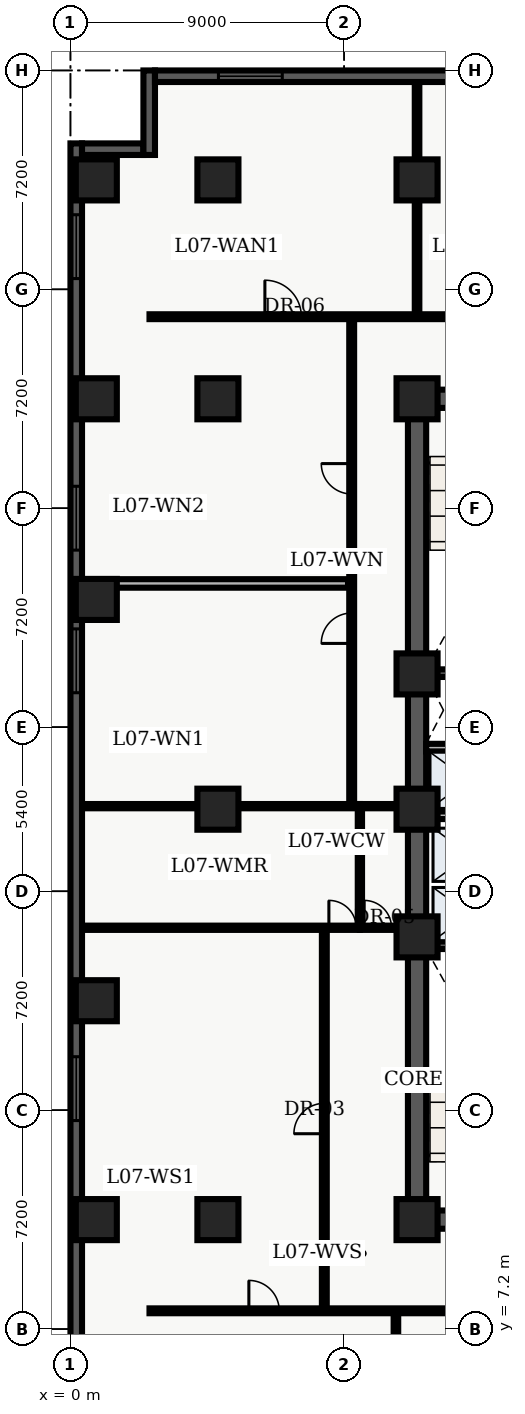
"""IFC4 building model, lengths in metres.
Left out: names, types, materials, properties, quantities, classifications, styles, units other than length and angle.
Written with IfcOpenShell. Run it as: python <this file> out.ifc"""

import sys

from ifc_helpers import new_model, entity, si_unit, converted_unit, direction, frame, origin_with_axes, origin_2d_with_axis, place, context, subcontext, project, spatial, polyline, rectangle, outline, extrude, element, fill, save


model = new_model("IFC4")
c1 = context("Model", 3, precision=1e-05, world=origin_with_axes(), true_north=direction((0.0, 1.0)))
c2 = subcontext(c1, "Body", "Model", "MODEL_VIEW")
j1 = project(units=[si_unit("LENGTHUNIT", "METRE"), converted_unit("PLANEANGLEUNIT", "DEGREE", entity("IfcPlaneAngleMeasure", 0.017), si_unit("PLANEANGLEUNIT", "RADIAN"), dimensions=[0, 0, 0, 0, 0, 0, 0])], contexts=[c1])
p1 = place(None, origin_with_axes())
s1 = spatial("IfcSite", under=j1, at=p1, CompositionType="ELEMENT")
p2 = place(p1, origin_with_axes())
s2 = spatial("IfcBuilding", under=s1, at=p2, CompositionType="ELEMENT")
p3 = place(p2, frame((0.0, 0.0, 32.7), z_axis=(0.0, 0.0, 1.0), x_axis=(1.0, 0.0, 0.0)))
s3 = spatial("IfcBuildingStorey", under=s2, at=p3, CompositionType="ELEMENT", Elevation=32.7)
p4 = place(p3, frame((11.4, 10.8, 0.0), z_axis=(0.0, 0.0, 1.0), x_axis=(0.0, 1.0, 0.0)))
e1 = element("IfcWall", 1, at=p4, inside=s3, PredefinedType="SHEAR", context=c2, shape_type="SweptSolid", body=[
    extrude(outline(polyline([(0.0, -0.3), (27.0, -0.3), (27.0, 0.3), (0.0, 0.3), (0.0, -0.3)])), origin_with_axes(), (0.0, 0.0, 1.0), 3.66),
])
p5 = place(p3, frame((11.4, 10.8, 0.0), z_axis=(0.0, 0.0, 1.0), x_axis=(1.0, 0.0, 0.0)))
e2 = element("IfcWall", 2, at=p5, inside=s3, PredefinedType="SHEAR", context=c2, shape_type="SweptSolid", body=[
    extrude(outline(polyline([(0.0, -0.3), (7.2, -0.3), (7.2, 0.3), (0.0, 0.3), (0.0, -0.3)])), origin_with_axes(), (0.0, 0.0, 1.0), 3.66),
])
p6 = place(p5, frame((2.625, 0.0, 0.0), z_axis=(0.0, 0.0, 1.0), x_axis=(1.0, 0.0, 0.0)))
e3 = element("IfcOpeningElement", 3, at=p6, cuts=e2, PredefinedType="OPENING", context=c2, shape_type="SweptSolid", body=[
    extrude(rectangle(XDim=1.05, YDim=0.62, at=origin_2d_with_axis()), origin_with_axes(), (0.0, 0.0, 1.0), 2.15),
])
p7 = place(p3, frame((11.4, 37.8, 0.0), z_axis=(0.0, 0.0, 1.0), x_axis=(1.0, 0.0, 0.0)))
e4 = element("IfcWall", 4, at=p7, inside=s3, PredefinedType="SHEAR", context=c2, shape_type="SweptSolid", body=[
    extrude(outline(polyline([(0.0, -0.3), (7.2, -0.3), (7.2, 0.3), (0.0, 0.3), (0.0, -0.3)])), origin_with_axes(), (0.0, 0.0, 1.0), 3.66),
])
p8 = place(p7, frame((2.625, 0.0, 0.0), z_axis=(0.0, 0.0, 1.0), x_axis=(1.0, 0.0, 0.0)))
e5 = element("IfcOpeningElement", 5, at=p8, cuts=e4, PredefinedType="OPENING", context=c2, shape_type="SweptSolid", body=[
    extrude(rectangle(XDim=1.05, YDim=0.62, at=origin_2d_with_axis()), origin_with_axes(), (0.0, 0.0, 1.0), 2.15),
])
for number, where, z_axis, x_axis in (
    (6, (11.7, 19.825, 0.0), (0.0, 0.0, 1.0), (1.0, 0.0, 0.0)),
    (7, (11.7, 28.775, 0.0), (0.0, 0.0, 1.0), (1.0, 0.0, 0.0)),
):
    element("IfcWall", number, at=place(p3, frame(where, z_axis=z_axis, x_axis=x_axis)), inside=s3, PredefinedType="SHEAR", context=c2, shape_type="SweptSolid", body=[
        extrude(outline(polyline([(0.0, -0.125), (6.6, -0.125), (6.6, 0.125), (0.0, 0.125), (0.0, -0.125)])), origin_with_axes(), (0.0, 0.0, 1.0), 3.66),
    ])
p9 = place(p3, frame((11.7, 24.1, 0.0), z_axis=(0.0, 0.0, 1.0), x_axis=(1.0, 0.0, 0.0)))
e8 = element("IfcWall", 8, at=p9, inside=s3, PredefinedType="SOLIDWALL", context=c2, shape_type="SweptSolid", body=[
    extrude(outline(polyline([(0.0, -0.125), (6.6, -0.125), (6.6, 0.125), (0.0, 0.125), (0.0, -0.125)])), origin_with_axes(), (0.0, 0.0, 1.0), 2.7),
])
p10 = place(p9, frame((3.75, 0.0, 0.0), z_axis=(0.0, 0.0, 1.0), x_axis=(1.0, 0.0, 0.0)))
e9 = element("IfcOpeningElement", 9, at=p10, cuts=e8, PredefinedType="OPENING", context=c2, shape_type="SweptSolid", body=[
    extrude(rectangle(XDim=0.9, YDim=0.27, at=origin_2d_with_axis()), origin_with_axes(), (0.0, 0.0, 1.0), 2.15),
])
p11 = place(p3, frame((11.7, 26.325, 0.0), z_axis=(0.0, 0.0, 1.0), x_axis=(1.0, 0.0, 0.0)))
e10 = element("IfcWall", 10, at=p11, inside=s3, PredefinedType="SOLIDWALL", context=c2, shape_type="SweptSolid", body=[
    extrude(outline(polyline([(0.0, -0.125), (6.6, -0.125), (6.6, 0.125), (0.0, 0.125), (0.0, -0.125)])), origin_with_axes(), (0.0, 0.0, 1.0), 2.7),
])
p12 = place(p11, frame((3.5, 0.0, 0.0), z_axis=(0.0, 0.0, 1.0), x_axis=(1.0, 0.0, 0.0)))
e11 = element("IfcOpeningElement", 11, at=p12, cuts=e10, PredefinedType="OPENING", context=c2, shape_type="SweptSolid", body=[
    extrude(rectangle(XDim=0.9, YDim=0.27, at=origin_2d_with_axis()), origin_with_axes(), (0.0, 0.0, 1.0), 2.15),
])
for number, where, z_axis, x_axis in (
    (12, (11.4, 10.8, 0.0), (0.0, 0.0, 1.0), (1.0, 0.0, 0.0)),
    (13, (11.4, 20.1, 0.0), (0.0, 0.0, 1.0), (1.0, 0.0, 0.0)),
    (14, (11.4, 24.3, 0.0), (0.0, 0.0, 1.0), (1.0, 0.0, 0.0)),
    (15, (11.4, 28.75, 0.0), (0.0, 0.0, 1.0), (1.0, 0.0, 0.0)),
    (16, (11.4, 37.8, 0.0), (0.0, 0.0, 1.0), (1.0, 0.0, 0.0)),
    (17, (11.4, 45.0, 0.0), (0.0, 0.0, 1.0), (1.0, 0.0, 0.0)),
    (18, (4.85, 10.8, 0.0), (0.0, 0.0, 1.0), (1.0, 0.0, 0.0)),
    (19, (4.85, 24.3, 0.0), (0.0, 0.0, 1.0), (1.0, 0.0, 0.0)),
    (20, (4.85, 37.8, 0.0), (0.0, 0.0, 1.0), (1.0, 0.0, 0.0)),
    (21, (4.85, 45.0, 0.0), (0.0, 0.0, 1.0), (1.0, 0.0, 0.0)),
    (22, (0.85, 10.8, 0.0), (0.0, 0.0, 1.0), (1.0, 0.0, 0.0)),
    (23, (0.85, 18.0, 0.0), (0.0, 0.0, 1.0), (1.0, 0.0, 0.0)),
    (24, (0.85, 31.2, 0.0), (0.0, 0.0, 1.0), (1.0, 0.0, 0.0)),
    (25, (0.85, 37.8, 0.0), (0.0, 0.0, 1.0), (1.0, 0.0, 0.0)),
    (26, (0.85, 45.0, 0.0), (0.0, 0.0, 1.0), (1.0, 0.0, 0.0)),
):
    element("IfcColumn", number, at=place(p3, frame(where, z_axis=z_axis, x_axis=x_axis)), inside=s3, PredefinedType="COLUMN", context=c2, shape_type="SweptSolid", body=[
        extrude(rectangle(XDim=1.35, YDim=1.35, at=origin_2d_with_axis()), origin_with_axes(), (0.0, 0.0, 1.0), 3.9),
    ])
p13 = place(p3, frame((9.52, 20.4, 0.0), z_axis=(0.0, 0.0, 1.0), x_axis=(0.0, 1.0, 0.0)))
e27 = element("IfcWall", 27, at=p13, inside=s3, PredefinedType="PARTITIONING", context=c2, shape_type="SweptSolid", body=[
    extrude(outline(polyline([(0.0, -0.07), (4.0, -0.07), (4.0, 0.07), (0.0, 0.07), (0.0, -0.07)])), origin_with_axes(), (0.0, 0.0, 1.0), 2.7),
])
p14 = place(p3, frame((9.52, 20.4, 0.0), z_axis=(0.0, 0.0, 1.0), x_axis=(1.0, 0.0, 0.0)))
e28 = element("IfcWall", 28, at=p14, inside=s3, PredefinedType="PARTITIONING", context=c2, shape_type="SweptSolid", body=[
    extrude(outline(polyline([(0.0, -0.07), (1.58, -0.07), (1.58, 0.07), (0.0, 0.07), (0.0, -0.07)])), origin_with_axes(), (0.0, 0.0, 1.0), 2.7),
])
p15 = place(p14, frame((0.59, 0.0, 0.0), z_axis=(0.0, 0.0, 1.0), x_axis=(1.0, 0.0, 0.0)))
e29 = element("IfcOpeningElement", 29, at=p15, cuts=e28, PredefinedType="OPENING", context=c2, shape_type="SweptSolid", body=[
    extrude(rectangle(XDim=0.9, YDim=0.16, at=origin_2d_with_axis()), origin_with_axes(), (0.0, 0.0, 1.0), 2.15),
])
p16 = place(p3, frame((9.52, 24.4, 0.0), z_axis=(0.0, 0.0, 1.0), x_axis=(1.0, 0.0, 0.0)))
e30 = element("IfcWall", 30, at=p16, inside=s3, PredefinedType="PARTITIONING", context=c2, shape_type="SweptSolid", body=[
    extrude(outline(polyline([(0.0, -0.07), (1.58, -0.07), (1.58, 0.07), (0.0, 0.07), (0.0, -0.07)])), origin_with_axes(), (0.0, 0.0, 1.0), 2.7),
])
p17 = place(p3, frame((2.6, 7.8, 0.0), z_axis=(0.0, 0.0, 1.0), x_axis=(1.0, 0.0, 0.0)))
e31 = element("IfcWall", 31, at=p17, inside=s3, PredefinedType="PARTITIONING", context=c2, shape_type="SweptSolid", body=[
    extrude(outline(polyline([(0.0, -0.08), (18.55, -0.08), (18.55, 0.08), (0.0, 0.08), (0.0, -0.08)])), origin_with_axes(), (0.0, 0.0, 1.0), 2.7),
])
p18 = place(p17, frame((3.768, 0.0, 0.0), z_axis=(0.0, 0.0, 1.0), x_axis=(1.0, 0.0, 0.0)))
e32 = element("IfcOpeningElement", 32, at=p18, cuts=e31, PredefinedType="OPENING", context=c2, shape_type="SweptSolid", body=[
    extrude(rectangle(XDim=1.0, YDim=0.18, at=origin_2d_with_axis()), origin_with_axes(), (0.0, 0.0, 1.0), 2.15),
])
p19 = place(p17, frame((13.303, 0.0, 0.0), z_axis=(0.0, 0.0, 1.0), x_axis=(1.0, 0.0, 0.0)))
e33 = element("IfcOpeningElement", 33, at=p19, cuts=e31, PredefinedType="OPENING", context=c2, shape_type="SweptSolid", body=[
    extrude(rectangle(XDim=1.0, YDim=0.18, at=origin_2d_with_axis()), origin_with_axes(), (0.0, 0.0, 1.0), 2.15),
])
p20 = place(p3, frame((2.6, 40.5, 0.0), z_axis=(0.0, 0.0, 1.0), x_axis=(1.0, 0.0, 0.0)))
e34 = element("IfcWall", 34, at=p20, inside=s3, PredefinedType="PARTITIONING", context=c2, shape_type="SweptSolid", body=[
    extrude(outline(polyline([(0.0, -0.08), (18.65, -0.08), (18.65, 0.08), (0.0, 0.08), (0.0, -0.08)])), origin_with_axes(), (0.0, 0.0, 1.0), 2.7),
])
p21 = place(p20, frame((4.395, 0.0, 0.0), z_axis=(0.0, 0.0, 1.0), x_axis=(1.0, 0.0, 0.0)))
e35 = element("IfcOpeningElement", 35, at=p21, cuts=e34, PredefinedType="OPENING", context=c2, shape_type="SweptSolid", body=[
    extrude(rectangle(XDim=1.2, YDim=0.18, at=origin_2d_with_axis()), origin_with_axes(), (0.0, 0.0, 1.0), 2.2),
])
p22 = place(p20, frame((12.61, 0.0, 0.0), z_axis=(0.0, 0.0, 1.0), x_axis=(1.0, 0.0, 0.0)))
e36 = element("IfcOpeningElement", 36, at=p22, cuts=e34, PredefinedType="OPENING", context=c2, shape_type="SweptSolid", body=[
    extrude(rectangle(XDim=1.0, YDim=0.18, at=origin_2d_with_axis()), origin_with_axes(), (0.0, 0.0, 1.0), 2.15),
])
p23 = place(p3, frame((8.35, 7.8, 0.0), z_axis=(0.0, 0.0, 1.0), x_axis=(0.0, 1.0, 0.0)))
e37 = element("IfcWall", 37, at=p23, inside=s3, PredefinedType="PARTITIONING", context=c2, shape_type="SweptSolid", body=[
    extrude(outline(polyline([(0.0, -0.08), (12.6, -0.08), (12.6, 0.08), (0.0, 0.08), (0.0, -0.08)])), origin_with_axes(), (0.0, 0.0, 1.0), 2.7),
])
p24 = place(p23, frame((6.325, 0.0, 0.0), z_axis=(0.0, 0.0, 1.0), x_axis=(1.0, 0.0, 0.0)))
e38 = element("IfcOpeningElement", 38, at=p24, cuts=e37, PredefinedType="OPENING", context=c2, shape_type="SweptSolid", body=[
    extrude(rectangle(XDim=1.0, YDim=0.18, at=origin_2d_with_axis()), origin_with_axes(), (0.0, 0.0, 1.0), 2.15),
])
p25 = place(p3, frame((9.25, 24.4, 0.0), z_axis=(0.0, 0.0, 1.0), x_axis=(0.0, 1.0, 0.0)))
e39 = element("IfcWall", 39, at=p25, inside=s3, PredefinedType="PARTITIONING", context=c2, shape_type="SweptSolid", body=[
    extrude(outline(polyline([(0.0, -0.08), (16.1, -0.08), (16.1, 0.08), (0.0, 0.08), (0.0, -0.08)])), origin_with_axes(), (0.0, 0.0, 1.0), 2.7),
])
p26 = place(p25, frame((5.853, 0.0, 0.0), z_axis=(0.0, 0.0, 1.0), x_axis=(1.0, 0.0, 0.0)))
e40 = element("IfcOpeningElement", 40, at=p26, cuts=e39, PredefinedType="OPENING", context=c2, shape_type="SweptSolid", body=[
    extrude(rectangle(XDim=1.0, YDim=0.18, at=origin_2d_with_axis()), origin_with_axes(), (0.0, 0.0, 1.0), 2.15),
])
p27 = place(p25, frame((10.768, 0.0, 0.0), z_axis=(0.0, 0.0, 1.0), x_axis=(1.0, 0.0, 0.0)))
e41 = element("IfcOpeningElement", 41, at=p27, cuts=e39, PredefinedType="OPENING", context=c2, shape_type="SweptSolid", body=[
    extrude(rectangle(XDim=1.0, YDim=0.18, at=origin_2d_with_axis()), origin_with_axes(), (0.0, 0.0, 1.0), 2.15),
])
p28 = place(p3, frame((0.36, 20.4, 0.0), z_axis=(0.0, 0.0, 1.0), x_axis=(1.0, 0.0, 0.0)))
e42 = element("IfcWall", 42, at=p28, inside=s3, PredefinedType="PARTITIONING", context=c2, shape_type="SweptSolid", body=[
    extrude(outline(polyline([(0.0, -0.07), (9.16, -0.07), (9.16, 0.07), (0.0, 0.07), (0.0, -0.07)])), origin_with_axes(), (0.0, 0.0, 1.0), 2.7),
])
p29 = place(p28, frame((8.59, 0.0, 0.0), z_axis=(0.0, 0.0, 1.0), x_axis=(1.0, 0.0, 0.0)))
e43 = element("IfcOpeningElement", 43, at=p29, cuts=e42, PredefinedType="OPENING", context=c2, shape_type="SweptSolid", body=[
    extrude(rectangle(XDim=0.9, YDim=0.16, at=origin_2d_with_axis()), origin_with_axes(), (0.0, 0.0, 1.0), 2.15),
])
p30 = place(p3, frame((0.36, 24.4, 0.0), z_axis=(0.0, 0.0, 1.0), x_axis=(1.0, 0.0, 0.0)))
e44 = element("IfcWall", 44, at=p30, inside=s3, PredefinedType="PARTITIONING", context=c2, shape_type="SweptSolid", body=[
    extrude(outline(polyline([(0.0, -0.07), (9.16, -0.07), (9.16, 0.07), (0.0, 0.07), (0.0, -0.07)])), origin_with_axes(), (0.0, 0.0, 1.0), 2.7),
])
p31 = place(p3, frame((0.375, 31.726, 0.0), z_axis=(0.0, 0.0, 1.0), x_axis=(1.0, 0.0, 0.0)))
e45 = element("IfcWall", 45, at=p31, inside=s3, PredefinedType="PARTITIONING", context=c2, shape_type="SweptSolid", body=[
    extrude(outline(polyline([(0.0, -0.14), (8.755, -0.14), (8.755, 0.14), (0.0, 0.14), (0.0, -0.14)])), origin_with_axes(), (0.0, 0.0, 1.0), 2.7),
])
p32 = place(p3, frame((10.705, 0.36, 0.0), z_axis=(0.0, 0.0, 1.0), x_axis=(0.0, 1.0, 0.0)))
e46 = element("IfcWall", 46, at=p32, inside=s3, PredefinedType="PARTITIONING", context=c2, shape_type="SweptSolid", body=[
    extrude(outline(polyline([(0.0, -0.075), (7.34, -0.075), (7.34, 0.075), (0.0, 0.075), (0.0, -0.075)])), origin_with_axes(), (0.0, 0.0, 1.0), 2.7),
])
p33 = place(p3, frame((11.4, 40.6, 0.0), z_axis=(0.0, 0.0, 1.0), x_axis=(0.0, 1.0, 0.0)))
e47 = element("IfcWall", 47, at=p33, inside=s3, PredefinedType="PARTITIONING", context=c2, shape_type="SweptSolid", body=[
    extrude(outline(polyline([(0.0, -0.075), (7.64, -0.075), (7.64, 0.075), (0.0, 0.075), (0.0, -0.075)])), origin_with_axes(), (0.0, 0.0, 1.0), 2.7),
])
p34 = place(p3, frame((0.19, 2.78, 0.0), z_axis=(0.0, 0.0, 1.0), x_axis=(0.0, 1.0, 0.0)))
e48 = element("IfcWall", 48, at=p34, inside=s3, PredefinedType="SOLIDWALL", context=c2, shape_type="SweptSolid", body=[
    extrude(outline(polyline([(0.0, -0.19), (43.42, -0.19), (43.42, 0.19), (0.0, 0.19), (0.0, -0.19)])), origin_with_axes(), (0.0, 0.0, 1.0), 3.66),
])
p35 = place(p34, frame((2.946, 0.0, 0.45), z_axis=(0.0, 0.0, 1.0), x_axis=(1.0, 0.0, 0.0)))
e49 = element("IfcOpeningElement", 49, at=p35, cuts=e48, PredefinedType="OPENING", context=c2, shape_type="SweptSolid", body=[
    extrude(rectangle(XDim=2.1, YDim=0.4, at=origin_2d_with_axis()), origin_with_axes(), (0.0, 0.0, 1.0), 2.2),
])
p36 = place(p34, frame((12.328, 0.0, 0.45), z_axis=(0.0, 0.0, 1.0), x_axis=(1.0, 0.0, 0.0)))
e50 = element("IfcOpeningElement", 50, at=p36, cuts=e48, PredefinedType="OPENING", context=c2, shape_type="SweptSolid", body=[
    extrude(rectangle(XDim=2.1, YDim=0.4, at=origin_2d_with_axis()), origin_with_axes(), (0.0, 0.0, 1.0), 2.2),
])
p37 = place(p34, frame((26.401, 0.0, 0.45), z_axis=(0.0, 0.0, 1.0), x_axis=(1.0, 0.0, 0.0)))
e51 = element("IfcOpeningElement", 51, at=p37, cuts=e48, PredefinedType="OPENING", context=c2, shape_type="SweptSolid", body=[
    extrude(rectangle(XDim=2.1, YDim=0.4, at=origin_2d_with_axis()), origin_with_axes(), (0.0, 0.0, 1.0), 2.2),
])
p38 = place(p34, frame((31.092, 0.0, 0.45), z_axis=(0.0, 0.0, 1.0), x_axis=(1.0, 0.0, 0.0)))
e52 = element("IfcOpeningElement", 52, at=p38, cuts=e48, PredefinedType="OPENING", context=c2, shape_type="SweptSolid", body=[
    extrude(rectangle(XDim=2.1, YDim=0.4, at=origin_2d_with_axis()), origin_with_axes(), (0.0, 0.0, 1.0), 2.2),
])
p39 = place(p34, frame((40.024, 0.0, 0.45), z_axis=(0.0, 0.0, 1.0), x_axis=(1.0, 0.0, 0.0)))
e53 = element("IfcOpeningElement", 53, at=p39, cuts=e48, PredefinedType="OPENING", context=c2, shape_type="SweptSolid", body=[
    extrude(rectangle(XDim=2.1, YDim=0.4, at=origin_2d_with_axis()), origin_with_axes(), (0.0, 0.0, 1.0), 2.2),
])
p40 = place(p3, frame((0.38, 46.01, 0.0), z_axis=(0.0, 0.0, 1.0), x_axis=(1.0, 0.0, 0.0)))
e54 = element("IfcWall", 54, at=p40, inside=s3, PredefinedType="SOLIDWALL", context=c2, shape_type="SweptSolid", body=[
    extrude(outline(polyline([(0.0, -0.19), (2.02, -0.19), (2.02, 0.19), (0.0, 0.19), (0.0, -0.19)])), origin_with_axes(), (0.0, 0.0, 1.0), 3.66),
])
p41 = place(p3, frame((2.59, 45.82, 0.0), z_axis=(0.0, 0.0, 1.0), x_axis=(0.0, 1.0, 0.0)))
e55 = element("IfcWall", 55, at=p41, inside=s3, PredefinedType="SOLIDWALL", context=c2, shape_type="SweptSolid", body=[
    extrude(outline(polyline([(0.0, -0.19), (2.78, -0.19), (2.78, 0.19), (0.0, 0.19), (0.0, -0.19)])), origin_with_axes(), (0.0, 0.0, 1.0), 3.66),
])
p42 = place(p3, frame((2.78, 48.41, 0.0), z_axis=(0.0, 0.0, 1.0), x_axis=(1.0, 0.0, 0.0)))
e56 = element("IfcWall", 56, at=p42, inside=s3, PredefinedType="SOLIDWALL", context=c2, shape_type="SweptSolid", body=[
    extrude(outline(polyline([(0.0, -0.19), (16.42, -0.19), (16.42, 0.19), (0.0, 0.19), (0.0, -0.19)])), origin_with_axes(), (0.0, 0.0, 1.0), 3.66),
])
p43 = place(p42, frame((3.137, 0.0, 0.45), z_axis=(0.0, 0.0, 1.0), x_axis=(1.0, 0.0, 0.0)))
e57 = element("IfcOpeningElement", 57, at=p43, cuts=e56, PredefinedType="OPENING", context=c2, shape_type="SweptSolid", body=[
    extrude(rectangle(XDim=2.1, YDim=0.4, at=origin_2d_with_axis()), origin_with_axes(), (0.0, 0.0, 1.0), 2.2),
])
p44 = place(p42, frame((13.283, 0.0, 0.45), z_axis=(0.0, 0.0, 1.0), x_axis=(1.0, 0.0, 0.0)))
e58 = element("IfcOpeningElement", 58, at=p44, cuts=e56, PredefinedType="OPENING", context=c2, shape_type="SweptSolid", body=[
    extrude(rectangle(XDim=2.1, YDim=0.4, at=origin_2d_with_axis()), origin_with_axes(), (0.0, 0.0, 1.0), 2.2),
])
p45 = place(p14, frame((0.59, 0.0, 0.0), z_axis=(0.0, 0.0, 1.0), x_axis=(1.0, 0.0, 0.0)))
e59 = element("IfcDoor", 59, at=p45, inside=s3, OperationType="SINGLE_SWING_LEFT", PredefinedType="DOOR", context=c2, shape_type="SweptSolid", body=[
    extrude(rectangle(XDim=0.9, YDim=0.084, at=origin_2d_with_axis()), origin_with_axes(), (0.0, 0.0, 1.0), 2.15),
])
fill(e29, e59)
p46 = place(p28, frame((8.59, 0.0, 0.0), z_axis=(0.0, 0.0, 1.0), x_axis=(1.0, 0.0, 0.0)))
e60 = element("IfcDoor", 60, at=p46, inside=s3, OperationType="SINGLE_SWING_LEFT", PredefinedType="DOOR", context=c2, shape_type="SweptSolid", body=[
    extrude(rectangle(XDim=0.9, YDim=0.084, at=origin_2d_with_axis()), origin_with_axes(), (0.0, 0.0, 1.0), 2.15),
])
fill(e43, e60)
p47 = place(p23, frame((6.325, 0.0, 0.0), z_axis=(0.0, 0.0, 1.0), x_axis=(1.0, 0.0, 0.0)))
e61 = element("IfcDoor", 61, at=p47, inside=s3, OperationType="SINGLE_SWING_LEFT", PredefinedType="DOOR", context=c2, shape_type="SweptSolid", body=[
    extrude(rectangle(XDim=1.0, YDim=0.09, at=origin_2d_with_axis()), origin_with_axes(), (0.0, 0.0, 1.0), 2.15),
])
fill(e38, e61)
p48 = place(p25, frame((5.853, 0.0, 0.0), z_axis=(0.0, 0.0, 1.0), x_axis=(1.0, 0.0, 0.0)))
e62 = element("IfcDoor", 62, at=p48, inside=s3, OperationType="SINGLE_SWING_LEFT", PredefinedType="DOOR", context=c2, shape_type="SweptSolid", body=[
    extrude(rectangle(XDim=1.0, YDim=0.09, at=origin_2d_with_axis()), origin_with_axes(), (0.0, 0.0, 1.0), 2.15),
])
fill(e40, e62)
p49 = place(p25, frame((10.768, 0.0, 0.0), z_axis=(0.0, 0.0, 1.0), x_axis=(1.0, 0.0, 0.0)))
e63 = element("IfcDoor", 63, at=p49, inside=s3, OperationType="SINGLE_SWING_RIGHT", PredefinedType="DOOR", context=c2, shape_type="SweptSolid", body=[
    extrude(rectangle(XDim=1.0, YDim=0.09, at=origin_2d_with_axis()), origin_with_axes(), (0.0, 0.0, 1.0), 2.15),
])
fill(e41, e63)
p50 = place(p17, frame((3.768, 0.0, 0.0), z_axis=(0.0, 0.0, 1.0), x_axis=(1.0, 0.0, 0.0)))
e64 = element("IfcDoor", 64, at=p50, inside=s3, OperationType="SINGLE_SWING_LEFT", PredefinedType="DOOR", context=c2, shape_type="SweptSolid", body=[
    extrude(rectangle(XDim=1.0, YDim=0.09, at=origin_2d_with_axis()), origin_with_axes(), (0.0, 0.0, 1.0), 2.15),
])
fill(e32, e64)
p51 = place(p20, frame((4.395, 0.0, 0.0), z_axis=(0.0, 0.0, 1.0), x_axis=(1.0, 0.0, 0.0)))
e65 = element("IfcDoor", 65, at=p51, inside=s3, OperationType="SINGLE_SWING_LEFT", PredefinedType="DOOR", context=c2, shape_type="SweptSolid", body=[
    extrude(rectangle(XDim=1.2, YDim=0.09, at=origin_2d_with_axis()), origin_with_axes(), (0.0, 0.0, 1.0), 2.2),
])
fill(e35, e65)
p52 = place(p34, frame((12.328, 0.0, 0.45), z_axis=(0.0, 0.0, 1.0), x_axis=(1.0, 0.0, 0.0)))
e66 = element("IfcWindow", 66, at=p52, inside=s3, PredefinedType="WINDOW", context=c2, shape_type="SweptSolid", body=[
    extrude(rectangle(XDim=2.1, YDim=0.09, at=origin_2d_with_axis()), origin_with_axes(), (0.0, 0.0, 1.0), 2.2),
])
fill(e50, e66)
p53 = place(p34, frame((26.401, 0.0, 0.45), z_axis=(0.0, 0.0, 1.0), x_axis=(1.0, 0.0, 0.0)))
e67 = element("IfcWindow", 67, at=p53, inside=s3, PredefinedType="WINDOW", context=c2, shape_type="SweptSolid", body=[
    extrude(rectangle(XDim=2.1, YDim=0.09, at=origin_2d_with_axis()), origin_with_axes(), (0.0, 0.0, 1.0), 2.2),
])
fill(e51, e67)
p54 = place(p34, frame((31.092, 0.0, 0.45), z_axis=(0.0, 0.0, 1.0), x_axis=(1.0, 0.0, 0.0)))
e68 = element("IfcWindow", 68, at=p54, inside=s3, PredefinedType="WINDOW", context=c2, shape_type="SweptSolid", body=[
    extrude(rectangle(XDim=2.1, YDim=0.09, at=origin_2d_with_axis()), origin_with_axes(), (0.0, 0.0, 1.0), 2.2),
])
fill(e52, e68)
p55 = place(p34, frame((40.024, 0.0, 0.45), z_axis=(0.0, 0.0, 1.0), x_axis=(1.0, 0.0, 0.0)))
e69 = element("IfcWindow", 69, at=p55, inside=s3, PredefinedType="WINDOW", context=c2, shape_type="SweptSolid", body=[
    extrude(rectangle(XDim=2.1, YDim=0.09, at=origin_2d_with_axis()), origin_with_axes(), (0.0, 0.0, 1.0), 2.2),
])
fill(e53, e69)
p56 = place(p42, frame((3.137, 0.0, 0.45), z_axis=(0.0, 0.0, 1.0), x_axis=(1.0, 0.0, 0.0)))
e70 = element("IfcWindow", 70, at=p56, inside=s3, PredefinedType="WINDOW", context=c2, shape_type="SweptSolid", body=[
    extrude(rectangle(XDim=2.1, YDim=0.09, at=origin_2d_with_axis()), origin_with_axes(), (0.0, 0.0, 1.0), 2.2),
])
fill(e57, e70)
save(model, sys.argv[1])
